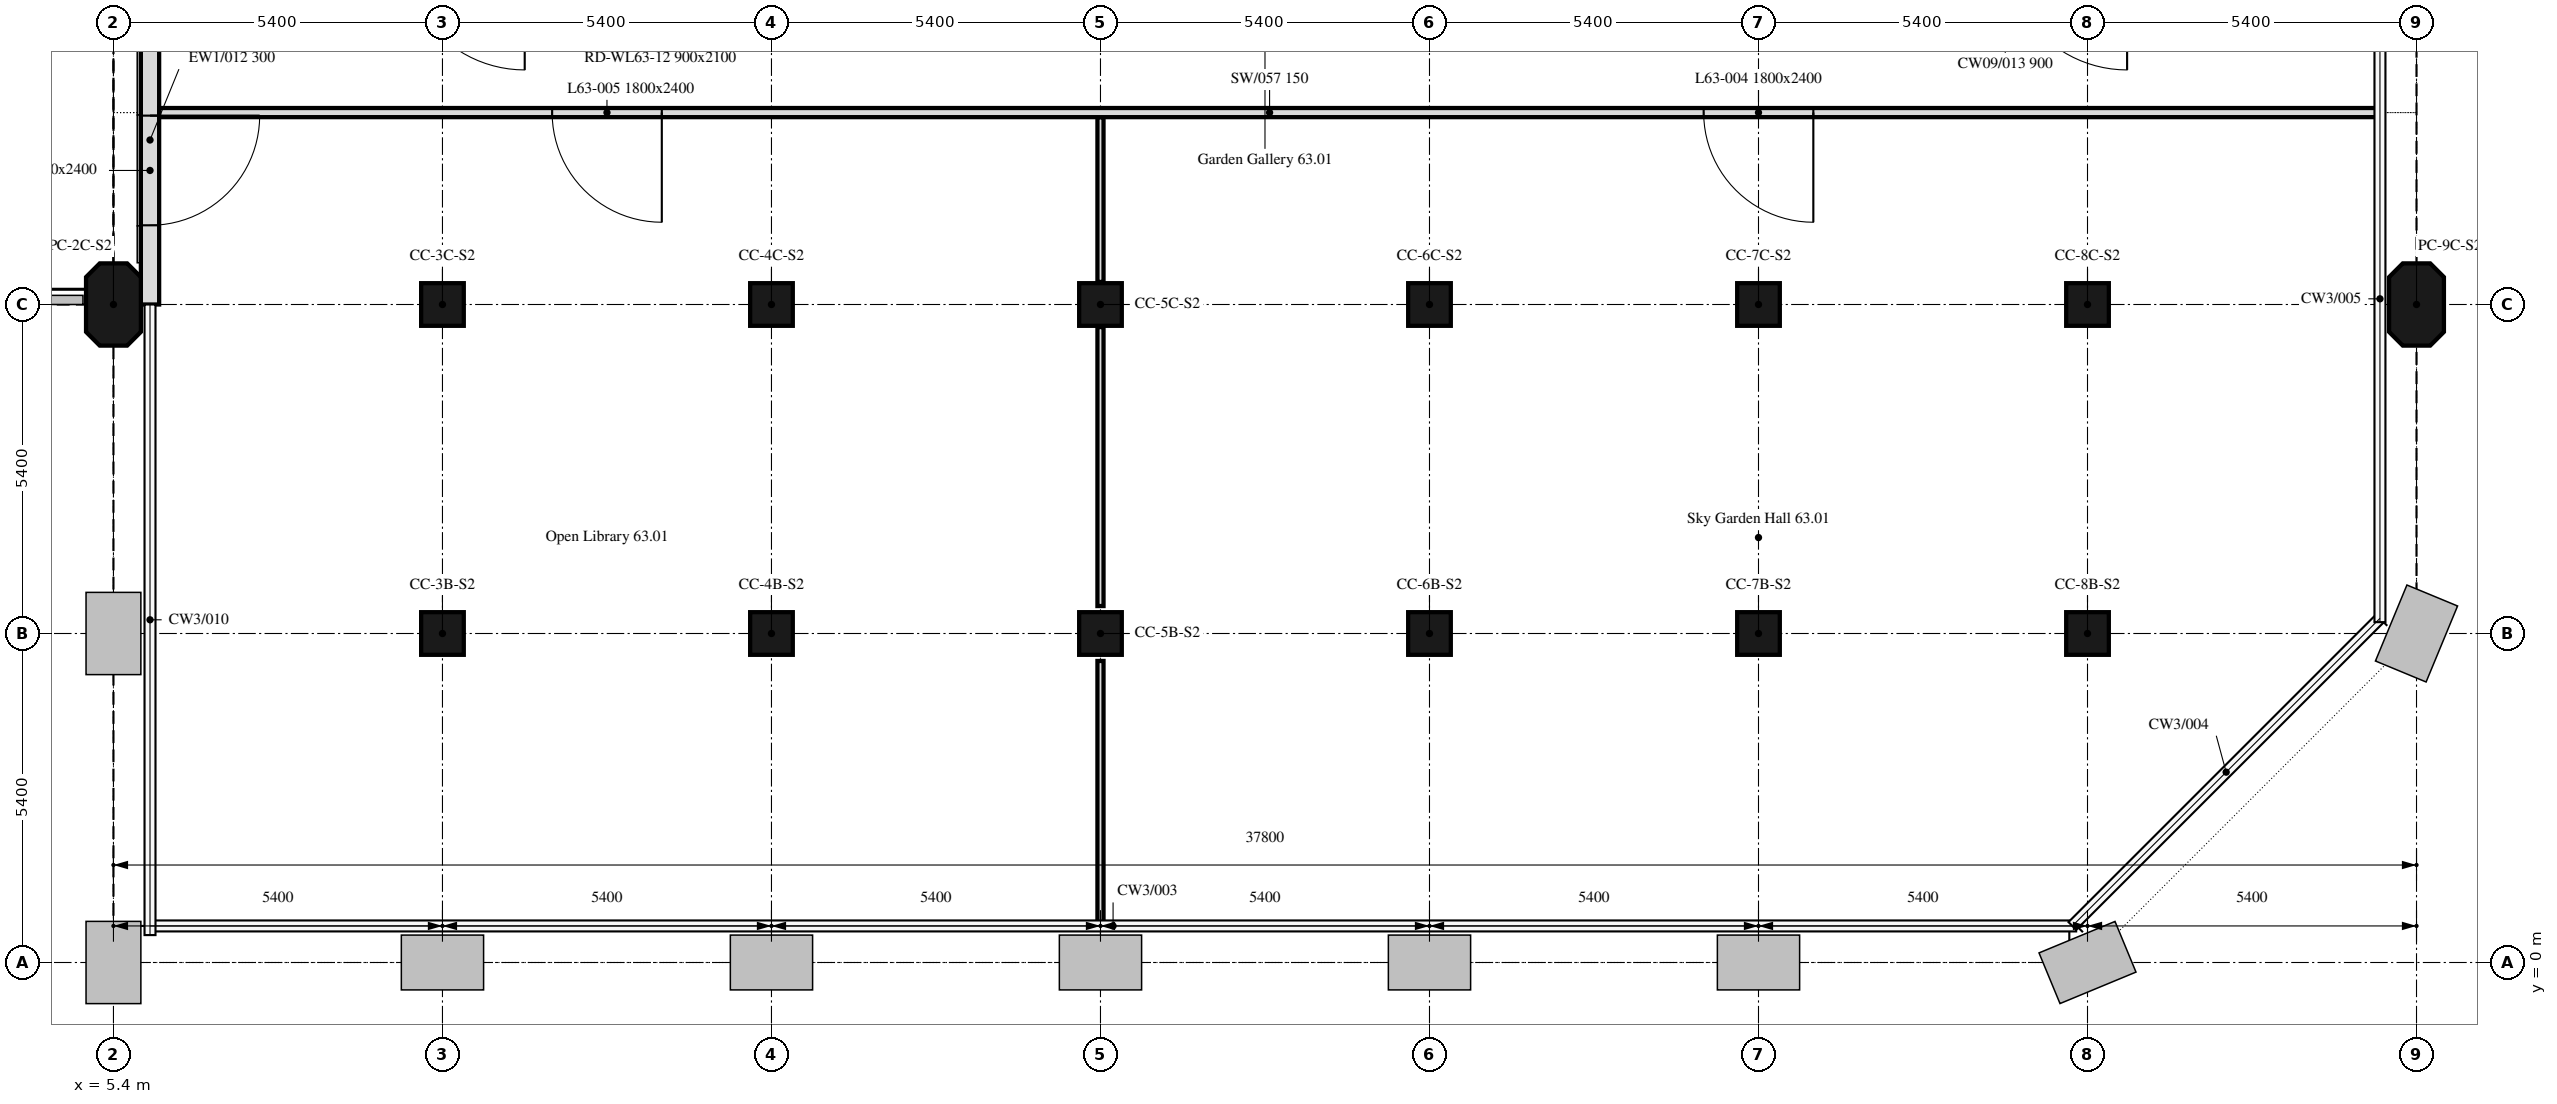
"""IFC4 building model, lengths in metres.
Left out: names, types, materials, properties, quantities, classifications, styles, units other than length and angle.
Written with IfcOpenShell. Run it as: python <this file> out.ifc"""

import sys

from ifc_helpers import new_model, si_unit, direction, frame, frame_2d, origin, origin_2d, place, context, subcontext, project, spatial, polyline, rectangle, outline, extrude, element, fill, save


model = new_model("IFC4")
c1 = context("Model", 3, precision=1e-05, world=origin(), true_north=direction((0.0, 1.0)))
c2 = subcontext(c1, "Body", "Model", "MODEL_VIEW")
j1 = project(units=[si_unit("LENGTHUNIT", "METRE"), si_unit("PLANEANGLEUNIT", "RADIAN")], contexts=[c1])
p1 = place(None, origin())
s1 = spatial("IfcSite", under=j1, at=p1, CompositionType="ELEMENT")
p2 = place(p1, origin())
s2 = spatial("IfcBuilding", under=s1, at=p2, CompositionType="ELEMENT")
p3 = place(p2, frame((0.0, 0.0, 260.5)))
s3 = spatial("IfcBuildingStorey", under=s2, at=p3, CompositionType="ELEMENT", Elevation=260.5)
for number, where, z_axis, x_axis in (
    (1, (10.8, 5.4, 0.0), (0.0, 0.0, 1.0), (1.0, 0.0, 0.0)),
    (2, (16.2, 5.4, 0.0), (0.0, 0.0, 1.0), (1.0, 0.0, 0.0)),
    (3, (21.6, 5.4, 0.0), (0.0, 0.0, 1.0), (1.0, 0.0, 0.0)),
    (4, (27.0, 5.4, 0.0), (0.0, 0.0, 1.0), (1.0, 0.0, 0.0)),
    (5, (32.4, 5.4, 0.0), (0.0, 0.0, 1.0), (1.0, 0.0, 0.0)),
    (6, (37.8, 5.4, 0.0), (0.0, 0.0, 1.0), (1.0, 0.0, 0.0)),
):
    element("IfcColumn", number, at=place(p3, frame(where, z_axis=z_axis, x_axis=x_axis)), inside=s3, PredefinedType="COLUMN", context=c2, shape_type="SweptSolid", body=[
        extrude(rectangle(XDim=0.7, YDim=0.7, at=origin_2d()), origin(), (0.0, 0.0, 1.0), 4.5),
    ])
p4 = place(p3, frame((5.4, 10.8, 0.0), z_axis=(0.0, 0.0, 1.0), x_axis=(0.0, 1.0, 0.0)))
e7 = element("IfcColumn", 7, at=p4, inside=s3, PredefinedType="COLUMN", context=c2, shape_type="SweptSolid", body=[
    extrude(outline(polyline([(-0.45, -0.45), (0.45, -0.45), (0.675, -0.225), (0.675, 0.225), (0.45, 0.45), (-0.45, 0.45), (-0.675, 0.225), (-0.675, -0.225), (-0.45, -0.45)])), origin(), (0.0, 0.0, 1.0), 4.5),
])
for number, where, z_axis, x_axis in (
    (8, (10.8, 10.8, 0.0), (0.0, 0.0, 1.0), (1.0, 0.0, 0.0)),
    (9, (16.2, 10.8, 0.0), (0.0, 0.0, 1.0), (1.0, 0.0, 0.0)),
    (10, (21.6, 10.8, 0.0), (0.0, 0.0, 1.0), (1.0, 0.0, 0.0)),
    (11, (27.0, 10.8, 0.0), (0.0, 0.0, 1.0), (1.0, 0.0, 0.0)),
    (12, (32.4, 10.8, 0.0), (0.0, 0.0, 1.0), (1.0, 0.0, 0.0)),
    (13, (37.8, 10.8, 0.0), (0.0, 0.0, 1.0), (1.0, 0.0, 0.0)),
):
    element("IfcColumn", number, at=place(p3, frame(where, z_axis=z_axis, x_axis=x_axis)), inside=s3, PredefinedType="COLUMN", context=c2, shape_type="SweptSolid", body=[
        extrude(rectangle(XDim=0.7, YDim=0.7, at=origin_2d()), origin(), (0.0, 0.0, 1.0), 4.5),
    ])
p5 = place(p3, frame((43.2, 10.8, 0.0), z_axis=(0.0, 0.0, 1.0), x_axis=(0.0, 1.0, 0.0)))
e14 = element("IfcColumn", 14, at=p5, inside=s3, PredefinedType="COLUMN", context=c2, shape_type="SweptSolid", body=[
    extrude(outline(polyline([(-0.45, -0.45), (0.45, -0.45), (0.675, -0.225), (0.675, 0.225), (0.45, 0.45), (-0.45, 0.45), (-0.675, 0.225), (-0.675, -0.225), (-0.45, -0.45)])), origin(), (0.0, 0.0, 1.0), 4.5),
])
p6 = place(p3, frame((6.0, 16.2, 0.0), z_axis=(0.0, 0.0, 1.0), x_axis=(0.0, -1.0, 0.0)))
e15 = element("IfcWall", 15, at=p6, inside=s3, PredefinedType="SOLIDWALL", context=c2, shape_type="SweptSolid", body=[
    extrude(rectangle(XDim=5.4, YDim=0.3, at=frame_2d((2.7, 0.0))), origin(), (0.0, 0.0, 1.0), 4.5),
])
p7 = place(p6, frame((2.3, 0.0, 0.0)))
e16 = element("IfcOpeningElement", 16, at=p7, cuts=e15, PredefinedType="OPENING", context=c2, shape_type="SweptSolid", body=[
    extrude(rectangle(XDim=1.8, YDim=2.4, at=frame_2d((0.9, 1.2))), frame((0.0, 0.16, 0.0), z_axis=(0.0, -1.0, 0.0), x_axis=(1.0, 0.0, 0.0)), (0.0, 0.0, 1.0), 0.32),
])
p8 = place(p3, frame((21.6, 13.875, 0.0), z_axis=(0.0, 0.0, 1.0), x_axis=(0.0, -1.0, 0.0)))
e17 = element("IfcWall", 17, at=p8, inside=s3, PredefinedType="PARTITIONING", context=c2, shape_type="SweptSolid", body=[
    extrude(rectangle(XDim=2.705, YDim=0.1, at=frame_2d((1.353, 0.0))), origin(), (0.0, 0.0, 1.0), 3.75),
])
p9 = place(p3, frame((21.6, 10.43, 0.0), z_axis=(0.0, 0.0, 1.0), x_axis=(0.0, -1.0, 0.0)))
e18 = element("IfcWall", 18, at=p9, inside=s3, PredefinedType="PARTITIONING", context=c2, shape_type="SweptSolid", body=[
    extrude(rectangle(XDim=4.579, YDim=0.1, at=frame_2d((2.29, 0.0))), origin(), (0.0, 0.0, 1.0), 3.75),
])
p10 = place(p3, frame((21.6, 4.949, 0.0), z_axis=(0.0, 0.0, 1.0), x_axis=(0.0, -1.0, 0.0)))
e19 = element("IfcWall", 19, at=p10, inside=s3, PredefinedType="PARTITIONING", context=c2, shape_type="SweptSolid", body=[
    extrude(rectangle(XDim=4.349, YDim=0.1, at=frame_2d((2.175, 0.0))), origin(), (0.0, 0.0, 1.0), 3.75),
])
p11 = place(p3, frame((42.6, 13.95, 0.0), z_axis=(0.0, 0.0, 1.0), x_axis=(-1.0, 0.0, 0.0)))
e20 = element("IfcWall", 20, at=p11, inside=s3, PredefinedType="PARTITIONING", context=c2, shape_type="SweptSolid", body=[
    extrude(rectangle(XDim=36.449, YDim=0.15, at=frame_2d((18.225, 0.0))), origin(), (0.0, 0.0, 1.0), 3.75),
])
p12 = place(p11, frame((9.3, 0.0, 0.0)))
e21 = element("IfcOpeningElement", 21, at=p12, cuts=e20, PredefinedType="OPENING", context=c2, shape_type="SweptSolid", body=[
    extrude(rectangle(XDim=1.8, YDim=2.4, at=frame_2d((0.9, 1.2))), frame((0.0, 0.075, 0.0), z_axis=(0.0, -1.0, 0.0), x_axis=(1.0, 0.0, 0.0)), (0.0, 0.0, 1.0), 0.15),
])
p13 = place(p11, frame((28.2, 0.0, 0.0)))
e22 = element("IfcOpeningElement", 22, at=p13, cuts=e20, PredefinedType="OPENING", context=c2, shape_type="SweptSolid", body=[
    extrude(rectangle(XDim=1.8, YDim=2.4, at=frame_2d((0.9, 1.2))), frame((0.0, 0.075, 0.0), z_axis=(0.0, -1.0, 0.0), x_axis=(1.0, 0.0, 0.0)), (0.0, 0.0, 1.0), 0.15),
])
p14 = place(p7, origin())
e23 = element("IfcDoor", 23, at=p14, inside=s3, OperationType="DOUBLE_DOOR_DOUBLE_SWING", PredefinedType="DOOR", context=c2, shape_type="SweptSolid", body=[
    extrude(rectangle(XDim=1.8, YDim=2.4, at=frame_2d((0.9, 1.2))), frame((0.0, 0.025, 0.0), z_axis=(0.0, -1.0, 0.0), x_axis=(1.0, 0.0, 0.0)), (0.0, 0.0, 1.0), 0.05),
])
fill(e16, e23)
p15 = place(p12, origin())
e24 = element("IfcDoor", 24, at=p15, inside=s3, OperationType="DOUBLE_DOOR_SINGLE_SWING", PredefinedType="DOOR", context=c2, shape_type="SweptSolid", body=[
    extrude(rectangle(XDim=1.8, YDim=2.4, at=frame_2d((0.9, 1.2))), frame((0.0, 0.025, 0.0), z_axis=(0.0, -1.0, 0.0), x_axis=(1.0, 0.0, 0.0)), (0.0, 0.0, 1.0), 0.05),
])
fill(e21, e24)
p16 = place(p13, origin())
e25 = element("IfcDoor", 25, at=p16, inside=s3, OperationType="DOUBLE_DOOR_SINGLE_SWING", PredefinedType="DOOR", context=c2, shape_type="SweptSolid", body=[
    extrude(rectangle(XDim=1.8, YDim=2.4, at=frame_2d((0.9, 1.2))), frame((0.0, 0.025, 0.0), z_axis=(0.0, -1.0, 0.0), x_axis=(1.0, 0.0, 0.0)), (0.0, 0.0, 1.0), 0.05),
])
fill(e22, e25)
save(model, sys.argv[1])
